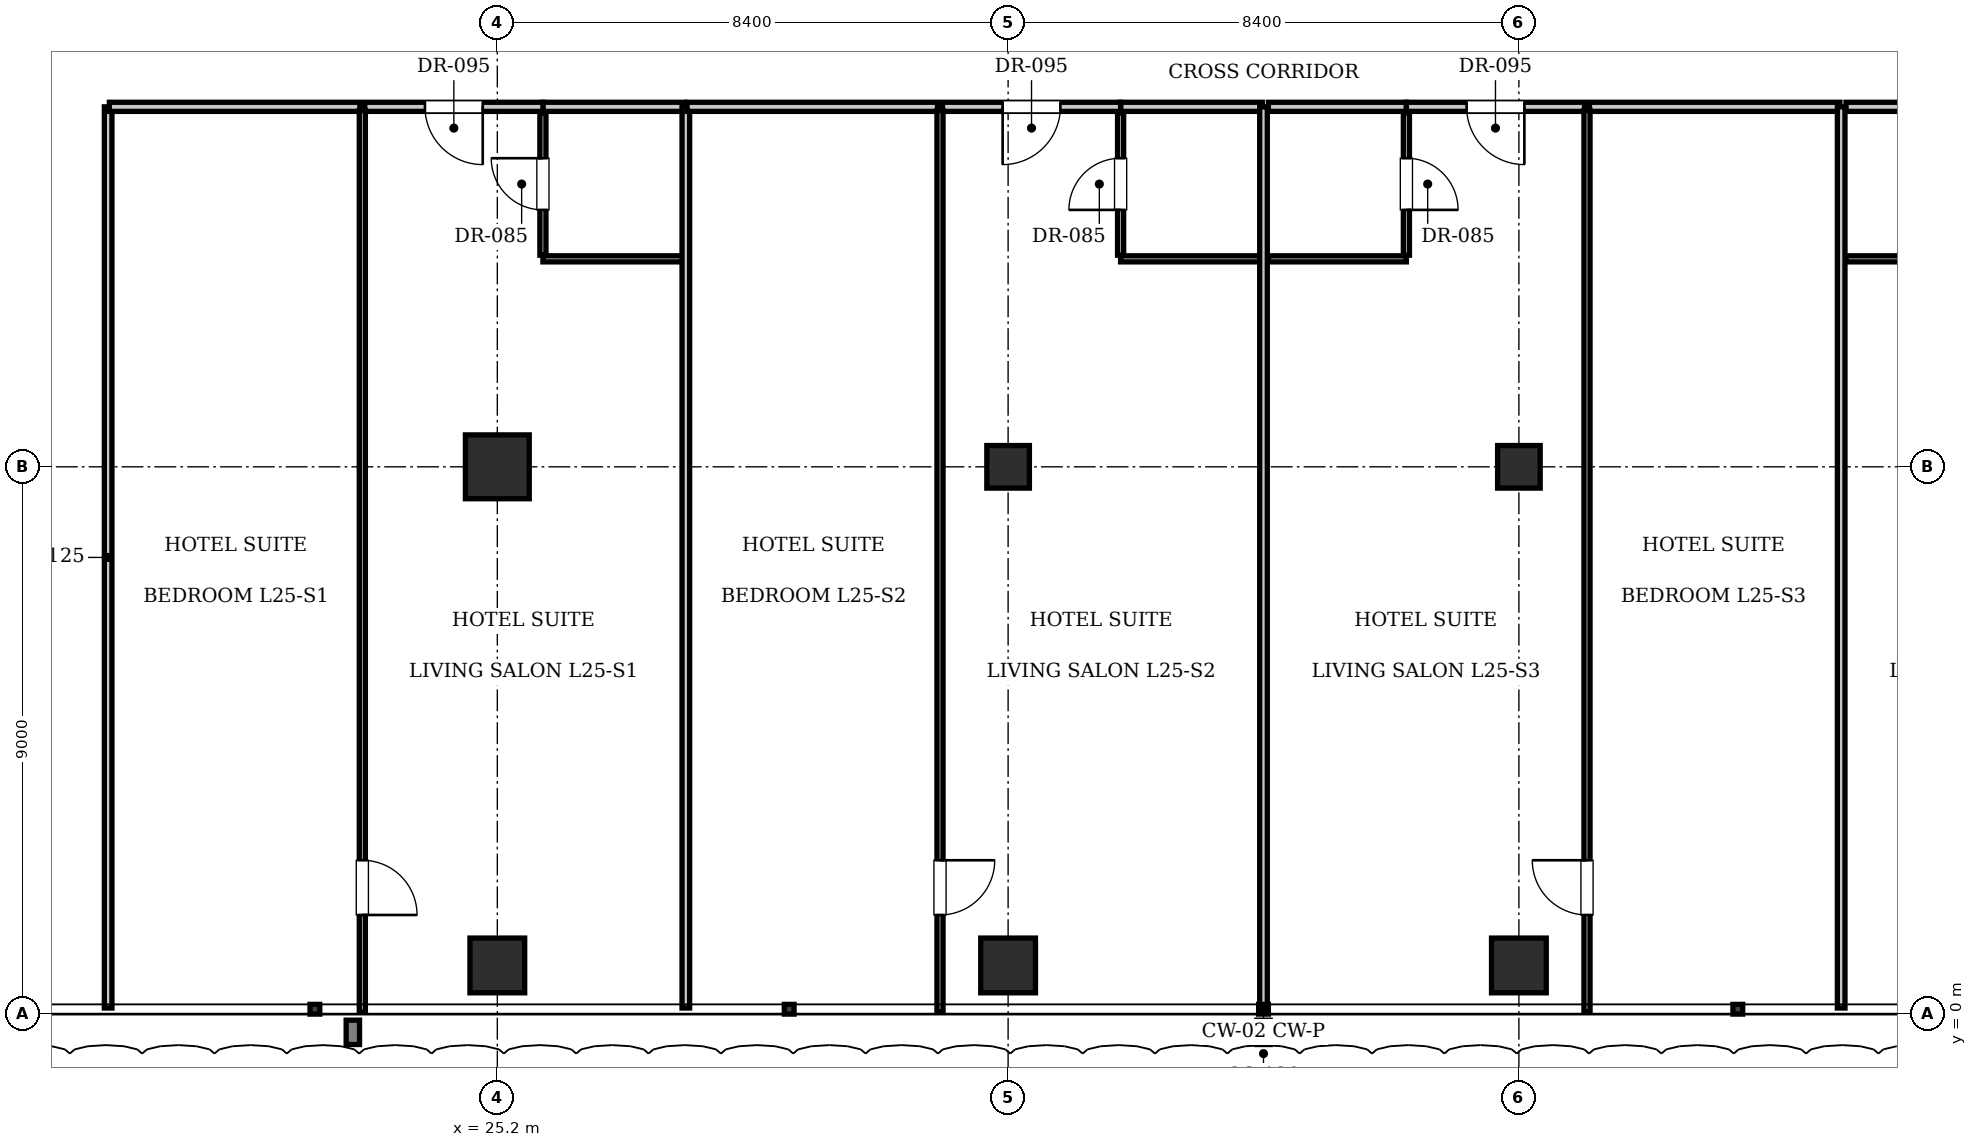
"""IFC4 building model, lengths in metres.
Left out: names, types, materials, properties, quantities, classifications, styles, units other than length and angle.
Written with IfcOpenShell. Run it as: python <this file> out.ifc"""

import sys

from ifc_helpers import new_model, si_unit, direction, frame, frame_2d, origin, origin_2d, place, context, subcontext, project, spatial, rectangle, i_section, extrude, element, fill, save


model = new_model("IFC4")
c1 = context("Model", 3, precision=1e-05, world=origin(), true_north=direction((0.0, 1.0)))
c2 = subcontext(c1, "Body", "Model", "MODEL_VIEW")
j1 = project(units=[si_unit("LENGTHUNIT", "METRE"), si_unit("PLANEANGLEUNIT", "RADIAN")], contexts=[c1])
p1 = place(None, origin())
s1 = spatial("IfcSite", under=j1, at=p1, CompositionType="ELEMENT")
p2 = place(p1, origin())
s2 = spatial("IfcBuilding", under=s1, at=p2, CompositionType="ELEMENT")
p3 = place(p2, frame((0.0, 0.0, 103.95)))
s3 = spatial("IfcBuildingStorey", under=s2, at=p3, CompositionType="ELEMENT", Elevation=103.95)
p4 = place(p3, frame((25.2, 9.0, 0.0), z_axis=(0.0, 0.0, 1.0), x_axis=(1.0, 0.0, 0.0)))
e1 = element("IfcColumn", 1, at=p4, inside=s3, PredefinedType="COLUMN", context=c2, shape_type="SweptSolid", body=[
    extrude(rectangle(XDim=1.05, YDim=1.05, at=origin_2d()), origin(), (0.0, 0.0, 1.0), 3.85),
])
for number, where, z_axis, x_axis in (
    (2, (33.6, 9.0, 0.0), (0.0, 0.0, 1.0), (1.0, 0.0, 0.0)),
    (3, (42.0, 9.0, 0.0), (0.0, 0.0, 1.0), (1.0, 0.0, 0.0)),
):
    element("IfcColumn", number, at=place(p3, frame(where, z_axis=z_axis, x_axis=x_axis)), inside=s3, PredefinedType="COLUMN", context=c2, shape_type="SweptSolid", body=[
        extrude(i_section(OverallWidth=0.7, OverallDepth=0.7, WebThickness=0.028, FlangeThickness=0.044, at=origin_2d()), origin(), (0.0, 0.0, 1.0), 3.85),
    ])
for number, where, z_axis, x_axis in (
    (4, (25.2, 0.8, 0.0), (0.0, 0.0, 1.0), (1.0, 0.0, 0.0)),
    (5, (33.6, 0.8, 0.0), (0.0, 0.0, 1.0), (1.0, 0.0, 0.0)),
    (6, (42.0, 0.8, 0.0), (0.0, 0.0, 1.0), (1.0, 0.0, 0.0)),
):
    element("IfcColumn", number, at=place(p3, frame(where, z_axis=z_axis, x_axis=x_axis)), inside=s3, PredefinedType="COLUMN", context=c2, shape_type="SweptSolid", body=[
        extrude(rectangle(XDim=0.9, YDim=0.9, at=origin_2d()), origin(), (0.0, 0.0, 1.0), 3.85),
    ])
p5 = place(p3, frame((18.8, 0.1, 0.0), z_axis=(0.0, 0.0, 1.0), x_axis=(0.0, 1.0, 0.0)))
e7 = element("IfcWall", 7, at=p5, inside=s3, PredefinedType="PARTITIONING", context=c2, shape_type="SweptSolid", body=[
    extrude(rectangle(XDim=14.82, YDim=0.125, at=frame_2d((7.41, 0.0))), origin(), (0.0, 0.0, 1.0), 3.61),
])
p6 = place(p3, frame((25.95, 14.92, 0.0), z_axis=(0.0, 0.0, 1.0), x_axis=(1.0, 0.0, 0.0)))
e8 = element("IfcWall", 8, at=p6, inside=s3, PredefinedType="PARTITIONING", context=c2, shape_type="SweptSolid", body=[
    extrude(rectangle(XDim=2.33, YDim=0.15, at=frame_2d((1.165, 0.0))), origin(), (0.0, 0.0, 1.0), 3.61),
])
p7 = place(p3, frame((25.95, 12.42, 0.0), z_axis=(0.0, 0.0, 1.0), x_axis=(1.0, 0.0, 0.0)))
e9 = element("IfcWall", 9, at=p7, inside=s3, PredefinedType="PARTITIONING", context=c2, shape_type="SweptSolid", body=[
    extrude(rectangle(XDim=2.31, YDim=0.1, at=frame_2d((1.155, 0.0))), origin(), (0.0, 0.0, 1.0), 3.61),
])
p8 = place(p3, frame((25.95, 12.48, 0.0), z_axis=(0.0, 0.0, 1.0), x_axis=(0.0, 1.0, 0.0)))
e10 = element("IfcWall", 10, at=p8, inside=s3, PredefinedType="PARTITIONING", context=c2, shape_type="SweptSolid", body=[
    extrude(rectangle(XDim=2.34, YDim=0.1, at=frame_2d((1.17, 0.0))), origin(), (0.0, 0.0, 1.0), 3.61),
])
p9 = place(p8, frame((0.745, 0.0, 0.0)))
e11 = element("IfcOpeningElement", 11, at=p9, cuts=e10, PredefinedType="OPENING", context=c2, shape_type="SweptSolid", body=[
    extrude(rectangle(XDim=0.85, YDim=2.1, at=frame_2d((0.425, 1.05))), frame((0.0, 0.06, 0.0), z_axis=(0.0, -1.0, 0.0), x_axis=(1.0, 0.0, 0.0)), (0.0, 0.0, 1.0), 0.12),
])
p10 = place(p3, frame((18.82, 14.92, 0.0), z_axis=(0.0, 0.0, 1.0), x_axis=(1.0, 0.0, 0.0)))
e12 = element("IfcWall", 12, at=p10, inside=s3, PredefinedType="PARTITIONING", context=c2, shape_type="SweptSolid", body=[
    extrude(rectangle(XDim=4.12, YDim=0.15, at=frame_2d((2.06, 0.0))), origin(), (0.0, 0.0, 1.0), 3.61),
])
p11 = place(p3, frame((23.02, 14.92, 0.0), z_axis=(0.0, 0.0, 1.0), x_axis=(1.0, 0.0, 0.0)))
e13 = element("IfcWall", 13, at=p11, inside=s3, PredefinedType="PARTITIONING", context=c2, shape_type="SweptSolid", body=[
    extrude(rectangle(XDim=2.93, YDim=0.15, at=frame_2d((1.465, 0.0))), origin(), (0.0, 0.0, 1.0), 3.61),
])
p12 = place(p11, frame((0.99, 0.0, 0.0)))
e14 = element("IfcOpeningElement", 14, at=p12, cuts=e13, PredefinedType="OPENING", context=c2, shape_type="SweptSolid", body=[
    extrude(rectangle(XDim=0.95, YDim=2.15, at=frame_2d((0.475, 1.075))), frame((0.0, 0.085, 0.0), z_axis=(0.0, -1.0, 0.0), x_axis=(1.0, 0.0, 0.0)), (0.0, 0.0, 1.0), 0.17),
])
p13 = place(p3, frame((22.98, 0.03, 0.0), z_axis=(0.0, 0.0, 1.0), x_axis=(0.0, 1.0, 0.0)))
e15 = element("IfcWall", 15, at=p13, inside=s3, PredefinedType="PARTITIONING", context=c2, shape_type="SweptSolid", body=[
    extrude(rectangle(XDim=14.83, YDim=0.1, at=frame_2d((7.415, 0.0))), origin(), (0.0, 0.0, 1.0), 3.61),
])
p14 = place(p13, frame((1.6, 0.0, 0.0)))
e16 = element("IfcOpeningElement", 16, at=p14, cuts=e15, PredefinedType="OPENING", context=c2, shape_type="SweptSolid", body=[
    extrude(rectangle(XDim=0.9, YDim=2.1, at=frame_2d((0.45, 1.05))), frame((0.0, 0.06, 0.0), z_axis=(0.0, -1.0, 0.0), x_axis=(1.0, 0.0, 0.0)), (0.0, 0.0, 1.0), 0.12),
])
p15 = place(p3, frame((28.3, 0.1, 0.0), z_axis=(0.0, 0.0, 1.0), x_axis=(0.0, 1.0, 0.0)))
e17 = element("IfcWall", 17, at=p15, inside=s3, PredefinedType="PARTITIONING", context=c2, shape_type="SweptSolid", body=[
    extrude(rectangle(XDim=14.82, YDim=0.125, at=frame_2d((7.41, 0.0))), origin(), (0.0, 0.0, 1.0), 3.61),
])
p16 = place(p3, frame((35.45, 14.92, 0.0), z_axis=(0.0, 0.0, 1.0), x_axis=(1.0, 0.0, 0.0)))
e18 = element("IfcWall", 18, at=p16, inside=s3, PredefinedType="PARTITIONING", context=c2, shape_type="SweptSolid", body=[
    extrude(rectangle(XDim=2.33, YDim=0.15, at=frame_2d((1.165, 0.0))), origin(), (0.0, 0.0, 1.0), 3.61),
])
p17 = place(p3, frame((35.45, 12.42, 0.0), z_axis=(0.0, 0.0, 1.0), x_axis=(1.0, 0.0, 0.0)))
e19 = element("IfcWall", 19, at=p17, inside=s3, PredefinedType="PARTITIONING", context=c2, shape_type="SweptSolid", body=[
    extrude(rectangle(XDim=2.31, YDim=0.1, at=frame_2d((1.155, 0.0))), origin(), (0.0, 0.0, 1.0), 3.61),
])
p18 = place(p3, frame((35.45, 12.48, 0.0), z_axis=(0.0, 0.0, 1.0), x_axis=(0.0, 1.0, 0.0)))
e20 = element("IfcWall", 20, at=p18, inside=s3, PredefinedType="PARTITIONING", context=c2, shape_type="SweptSolid", body=[
    extrude(rectangle(XDim=2.34, YDim=0.1, at=frame_2d((1.17, 0.0))), origin(), (0.0, 0.0, 1.0), 3.61),
])
p19 = place(p18, frame((0.745, 0.0, 0.0)))
e21 = element("IfcOpeningElement", 21, at=p19, cuts=e20, PredefinedType="OPENING", context=c2, shape_type="SweptSolid", body=[
    extrude(rectangle(XDim=0.85, YDim=2.1, at=frame_2d((0.425, 1.05))), frame((0.0, 0.06, 0.0), z_axis=(0.0, -1.0, 0.0), x_axis=(1.0, 0.0, 0.0)), (0.0, 0.0, 1.0), 0.12),
])
p20 = place(p3, frame((28.32, 14.92, 0.0), z_axis=(0.0, 0.0, 1.0), x_axis=(1.0, 0.0, 0.0)))
e22 = element("IfcWall", 22, at=p20, inside=s3, PredefinedType="PARTITIONING", context=c2, shape_type="SweptSolid", body=[
    extrude(rectangle(XDim=4.12, YDim=0.15, at=frame_2d((2.06, 0.0))), origin(), (0.0, 0.0, 1.0), 3.61),
])
p21 = place(p3, frame((32.52, 14.92, 0.0), z_axis=(0.0, 0.0, 1.0), x_axis=(1.0, 0.0, 0.0)))
e23 = element("IfcWall", 23, at=p21, inside=s3, PredefinedType="PARTITIONING", context=c2, shape_type="SweptSolid", body=[
    extrude(rectangle(XDim=2.93, YDim=0.15, at=frame_2d((1.465, 0.0))), origin(), (0.0, 0.0, 1.0), 3.61),
])
p22 = place(p21, frame((0.99, 0.0, 0.0)))
e24 = element("IfcOpeningElement", 24, at=p22, cuts=e23, PredefinedType="OPENING", context=c2, shape_type="SweptSolid", body=[
    extrude(rectangle(XDim=0.95, YDim=2.15, at=frame_2d((0.475, 1.075))), frame((0.0, 0.085, 0.0), z_axis=(0.0, -1.0, 0.0), x_axis=(1.0, 0.0, 0.0)), (0.0, 0.0, 1.0), 0.17),
])
p23 = place(p3, frame((32.48, 0.03, 0.0), z_axis=(0.0, 0.0, 1.0), x_axis=(0.0, 1.0, 0.0)))
e25 = element("IfcWall", 25, at=p23, inside=s3, PredefinedType="PARTITIONING", context=c2, shape_type="SweptSolid", body=[
    extrude(rectangle(XDim=14.83, YDim=0.1, at=frame_2d((7.415, 0.0))), origin(), (0.0, 0.0, 1.0), 3.61),
])
p24 = place(p23, frame((1.6, 0.0, 0.0)))
e26 = element("IfcOpeningElement", 26, at=p24, cuts=e25, PredefinedType="OPENING", context=c2, shape_type="SweptSolid", body=[
    extrude(rectangle(XDim=0.9, YDim=2.1, at=frame_2d((0.45, 1.05))), frame((0.0, 0.06, 0.0), z_axis=(0.0, -1.0, 0.0), x_axis=(1.0, 0.0, 0.0)), (0.0, 0.0, 1.0), 0.12),
])
p25 = place(p3, frame((37.8, 0.1, 0.0), z_axis=(0.0, 0.0, 1.0), x_axis=(0.0, 1.0, 0.0)))
e27 = element("IfcWall", 27, at=p25, inside=s3, PredefinedType="PARTITIONING", context=c2, shape_type="SweptSolid", body=[
    extrude(rectangle(XDim=14.82, YDim=0.125, at=frame_2d((7.41, 0.0))), origin(), (0.0, 0.0, 1.0), 3.403),
])
p26 = place(p3, frame((37.88, 14.92, 0.0), z_axis=(0.0, 0.0, 1.0), x_axis=(1.0, 0.0, 0.0)))
e28 = element("IfcWall", 28, at=p26, inside=s3, PredefinedType="PARTITIONING", context=c2, shape_type="SweptSolid", body=[
    extrude(rectangle(XDim=2.27, YDim=0.15, at=frame_2d((1.135, 0.0))), origin(), (0.0, 0.0, 1.0), 3.61),
])
p27 = place(p3, frame((37.88, 12.42, 0.0), z_axis=(0.0, 0.0, 1.0), x_axis=(1.0, 0.0, 0.0)))
e29 = element("IfcWall", 29, at=p27, inside=s3, PredefinedType="PARTITIONING", context=c2, shape_type="SweptSolid", body=[
    extrude(rectangle(XDim=2.27, YDim=0.1, at=frame_2d((1.135, 0.0))), origin(), (0.0, 0.0, 1.0), 3.61),
])
p28 = place(p3, frame((40.15, 12.48, 0.0), z_axis=(0.0, 0.0, 1.0), x_axis=(0.0, 1.0, 0.0)))
e30 = element("IfcWall", 30, at=p28, inside=s3, PredefinedType="PARTITIONING", context=c2, shape_type="SweptSolid", body=[
    extrude(rectangle(XDim=2.34, YDim=0.1, at=frame_2d((1.17, 0.0))), origin(), (0.0, 0.0, 1.0), 3.61),
])
p29 = place(p28, frame((0.745, 0.0, 0.0)))
e31 = element("IfcOpeningElement", 31, at=p29, cuts=e30, PredefinedType="OPENING", context=c2, shape_type="SweptSolid", body=[
    extrude(rectangle(XDim=0.85, YDim=2.1, at=frame_2d((0.425, 1.05))), frame((0.0, 0.06, 0.0), z_axis=(0.0, -1.0, 0.0), x_axis=(1.0, 0.0, 0.0)), (0.0, 0.0, 1.0), 0.12),
])
p30 = place(p3, frame((40.15, 14.92, 0.0), z_axis=(0.0, 0.0, 1.0), x_axis=(1.0, 0.0, 0.0)))
e32 = element("IfcWall", 32, at=p30, inside=s3, PredefinedType="PARTITIONING", context=c2, shape_type="SweptSolid", body=[
    extrude(rectangle(XDim=2.93, YDim=0.15, at=frame_2d((1.465, 0.0))), origin(), (0.0, 0.0, 1.0), 3.61),
])
p31 = place(p30, frame((0.99, 0.0, 0.0)))
e33 = element("IfcOpeningElement", 33, at=p31, cuts=e32, PredefinedType="OPENING", context=c2, shape_type="SweptSolid", body=[
    extrude(rectangle(XDim=0.95, YDim=2.15, at=frame_2d((0.475, 1.075))), frame((0.0, 0.085, 0.0), z_axis=(0.0, -1.0, 0.0), x_axis=(1.0, 0.0, 0.0)), (0.0, 0.0, 1.0), 0.17),
])
p32 = place(p3, frame((43.16, 14.92, 0.0), z_axis=(0.0, 0.0, 1.0), x_axis=(1.0, 0.0, 0.0)))
e34 = element("IfcWall", 34, at=p32, inside=s3, PredefinedType="PARTITIONING", context=c2, shape_type="SweptSolid", body=[
    extrude(rectangle(XDim=4.12, YDim=0.15, at=frame_2d((2.06, 0.0))), origin(), (0.0, 0.0, 1.0), 3.61),
])
p33 = place(p3, frame((43.12, 0.03, 0.0), z_axis=(0.0, 0.0, 1.0), x_axis=(0.0, 1.0, 0.0)))
e35 = element("IfcWall", 35, at=p33, inside=s3, PredefinedType="PARTITIONING", context=c2, shape_type="SweptSolid", body=[
    extrude(rectangle(XDim=14.83, YDim=0.1, at=frame_2d((7.415, 0.0))), origin(), (0.0, 0.0, 1.0), 3.61),
])
p34 = place(p33, frame((1.6, 0.0, 0.0)))
e36 = element("IfcOpeningElement", 36, at=p34, cuts=e35, PredefinedType="OPENING", context=c2, shape_type="SweptSolid", body=[
    extrude(rectangle(XDim=0.9, YDim=2.1, at=frame_2d((0.45, 1.05))), frame((0.0, 0.06, 0.0), z_axis=(0.0, -1.0, 0.0), x_axis=(1.0, 0.0, 0.0)), (0.0, 0.0, 1.0), 0.12),
])
p35 = place(p3, frame((47.3, 0.1, 0.0), z_axis=(0.0, 0.0, 1.0), x_axis=(0.0, 1.0, 0.0)))
e37 = element("IfcWall", 37, at=p35, inside=s3, PredefinedType="PARTITIONING", context=c2, shape_type="SweptSolid", body=[
    extrude(rectangle(XDim=14.82, YDim=0.125, at=frame_2d((7.41, 0.0))), origin(), (0.0, 0.0, 1.0), 3.61),
])
p36 = place(p3, frame((47.38, 14.92, 0.0), z_axis=(0.0, 0.0, 1.0), x_axis=(1.0, 0.0, 0.0)))
e38 = element("IfcWall", 38, at=p36, inside=s3, PredefinedType="PARTITIONING", context=c2, shape_type="SweptSolid", body=[
    extrude(rectangle(XDim=2.27, YDim=0.15, at=frame_2d((1.135, 0.0))), origin(), (0.0, 0.0, 1.0), 3.61),
])
p37 = place(p3, frame((47.38, 12.42, 0.0), z_axis=(0.0, 0.0, 1.0), x_axis=(1.0, 0.0, 0.0)))
e39 = element("IfcWall", 39, at=p37, inside=s3, PredefinedType="PARTITIONING", context=c2, shape_type="SweptSolid", body=[
    extrude(rectangle(XDim=2.27, YDim=0.1, at=frame_2d((1.135, 0.0))), origin(), (0.0, 0.0, 1.0), 3.61),
])
p38 = place(p9, origin())
e40 = element("IfcDoor", 40, at=p38, inside=s3, OperationType="SINGLE_SWING_RIGHT", PredefinedType="DOOR", context=c2, shape_type="SweptSolid", body=[
    extrude(rectangle(XDim=0.85, YDim=2.1, at=frame_2d((0.425, 1.05))), frame((0.0, 0.025, 0.0), z_axis=(0.0, -1.0, 0.0), x_axis=(1.0, 0.0, 0.0)), (0.0, 0.0, 1.0), 0.05),
])
fill(e11, e40)
p39 = place(p12, frame((0.95, 0.0, 0.0), z_axis=(0.0, 0.0, 1.0), x_axis=(-1.0, 0.0, 0.0)))
e41 = element("IfcDoor", 41, at=p39, inside=s3, OperationType="SINGLE_SWING_LEFT", PredefinedType="DOOR", context=c2, shape_type="SweptSolid", body=[
    extrude(rectangle(XDim=0.95, YDim=2.15, at=frame_2d((0.475, 1.075))), frame((0.0, 0.025, 0.0), z_axis=(0.0, -1.0, 0.0), x_axis=(1.0, 0.0, 0.0)), (0.0, 0.0, 1.0), 0.05),
])
fill(e14, e41)
p40 = place(p14, frame((0.9, 0.0, 0.0), z_axis=(0.0, 0.0, 1.0), x_axis=(-1.0, 0.0, 0.0)))
e42 = element("IfcDoor", 42, at=p40, inside=s3, OperationType="SINGLE_SWING_RIGHT", PredefinedType="DOOR", context=c2, shape_type="SweptSolid", body=[
    extrude(rectangle(XDim=0.9, YDim=2.1, at=frame_2d((0.45, 1.05))), frame((0.0, 0.025, 0.0), z_axis=(0.0, -1.0, 0.0), x_axis=(1.0, 0.0, 0.0)), (0.0, 0.0, 1.0), 0.05),
])
fill(e16, e42)
p41 = place(p19, origin())
e43 = element("IfcDoor", 43, at=p41, inside=s3, OperationType="SINGLE_SWING_LEFT", PredefinedType="DOOR", context=c2, shape_type="SweptSolid", body=[
    extrude(rectangle(XDim=0.85, YDim=2.1, at=frame_2d((0.425, 1.05))), frame((0.0, 0.025, 0.0), z_axis=(0.0, -1.0, 0.0), x_axis=(1.0, 0.0, 0.0)), (0.0, 0.0, 1.0), 0.05),
])
fill(e21, e43)
p42 = place(p22, frame((0.95, 0.0, 0.0), z_axis=(0.0, 0.0, 1.0), x_axis=(-1.0, 0.0, 0.0)))
e44 = element("IfcDoor", 44, at=p42, inside=s3, OperationType="SINGLE_SWING_RIGHT", PredefinedType="DOOR", context=c2, shape_type="SweptSolid", body=[
    extrude(rectangle(XDim=0.95, YDim=2.15, at=frame_2d((0.475, 1.075))), frame((0.0, 0.025, 0.0), z_axis=(0.0, -1.0, 0.0), x_axis=(1.0, 0.0, 0.0)), (0.0, 0.0, 1.0), 0.05),
])
fill(e24, e44)
p43 = place(p24, frame((0.9, 0.0, 0.0), z_axis=(0.0, 0.0, 1.0), x_axis=(-1.0, 0.0, 0.0)))
e45 = element("IfcDoor", 45, at=p43, inside=s3, OperationType="SINGLE_SWING_LEFT", PredefinedType="DOOR", context=c2, shape_type="SweptSolid", body=[
    extrude(rectangle(XDim=0.9, YDim=2.1, at=frame_2d((0.45, 1.05))), frame((0.0, 0.025, 0.0), z_axis=(0.0, -1.0, 0.0), x_axis=(1.0, 0.0, 0.0)), (0.0, 0.0, 1.0), 0.05),
])
fill(e26, e45)
p44 = place(p29, frame((0.85, 0.0, 0.0), z_axis=(0.0, 0.0, 1.0), x_axis=(-1.0, 0.0, 0.0)))
e46 = element("IfcDoor", 46, at=p44, inside=s3, OperationType="SINGLE_SWING_RIGHT", PredefinedType="DOOR", context=c2, shape_type="SweptSolid", body=[
    extrude(rectangle(XDim=0.85, YDim=2.1, at=frame_2d((0.425, 1.05))), frame((0.0, 0.025, 0.0), z_axis=(0.0, -1.0, 0.0), x_axis=(1.0, 0.0, 0.0)), (0.0, 0.0, 1.0), 0.05),
])
fill(e31, e46)
p45 = place(p31, frame((0.95, 0.0, 0.0), z_axis=(0.0, 0.0, 1.0), x_axis=(-1.0, 0.0, 0.0)))
e47 = element("IfcDoor", 47, at=p45, inside=s3, OperationType="SINGLE_SWING_LEFT", PredefinedType="DOOR", context=c2, shape_type="SweptSolid", body=[
    extrude(rectangle(XDim=0.95, YDim=2.15, at=frame_2d((0.475, 1.075))), frame((0.0, 0.025, 0.0), z_axis=(0.0, -1.0, 0.0), x_axis=(1.0, 0.0, 0.0)), (0.0, 0.0, 1.0), 0.05),
])
fill(e33, e47)
p46 = place(p34, origin())
e48 = element("IfcDoor", 48, at=p46, inside=s3, OperationType="SINGLE_SWING_RIGHT", PredefinedType="DOOR", context=c2, shape_type="SweptSolid", body=[
    extrude(rectangle(XDim=0.9, YDim=2.1, at=frame_2d((0.45, 1.05))), frame((0.0, 0.025, 0.0), z_axis=(0.0, -1.0, 0.0), x_axis=(1.0, 0.0, 0.0)), (0.0, 0.0, 1.0), 0.05),
])
fill(e36, e48)
save(model, sys.argv[1])
